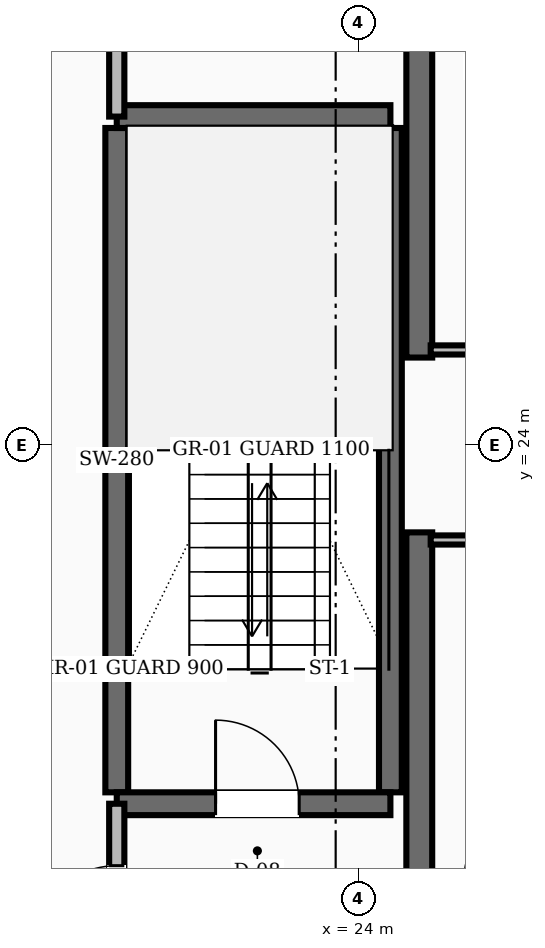
"""IFC4 building model, lengths in metres.
Left out: names, types, materials, properties, quantities, classifications, styles, units other than length and angle.
Written with IfcOpenShell. Run it as: python <this file> out.ifc"""

import sys

from ifc_helpers import new_model, si_unit, direction, frame, frame_2d, origin, place, context, subcontext, project, spatial, rectangle, extrude, element, fill, save


model = new_model("IFC4")
c1 = context("Model", 3, precision=1e-05, world=origin(), true_north=direction((0.0, 1.0)))
c2 = subcontext(c1, "Body", "Model", "MODEL_VIEW")
j1 = project(units=[si_unit("LENGTHUNIT", "METRE"), si_unit("PLANEANGLEUNIT", "RADIAN")], contexts=[c1])
p1 = place(None, origin())
s1 = spatial("IfcSite", under=j1, at=p1, CompositionType="ELEMENT")
p2 = place(p1, origin())
s2 = spatial("IfcBuilding", under=s1, at=p2, CompositionType="ELEMENT")
p3 = place(p2, frame((0.0, 0.0, 164.0)))
s3 = spatial("IfcBuildingStorey", under=s2, at=p3, CompositionType="ELEMENT", Elevation=164.0)
for number, where, z_axis, x_axis in (
    (1, (24.8, 16.55, 0.0), (0.0, 0.0, 1.0), (0.0, 1.0, 0.0)),
    (2, (24.8, 25.15, 0.0), (0.0, 0.0, 1.0), (0.0, 1.0, 0.0)),
):
    element("IfcWall", number, at=place(p3, frame(where, z_axis=z_axis, x_axis=x_axis)), inside=s3, PredefinedType="SHEAR", context=c2, shape_type="SweptSolid", body=[
        extrude(rectangle(XDim=6.3, YDim=0.34, at=frame_2d((3.15, 0.0))), origin(), (0.0, 0.0, 1.0), 3.6),
    ])
for number, where, z_axis, x_axis in (
    (3, (20.82, 19.43, 0.0), (0.0, 0.0, 1.0), (0.0, 1.0, 0.0)),
    (4, (24.42, 19.43, 0.0), (0.0, 0.0, 1.0), (0.0, 1.0, 0.0)),
):
    element("IfcWall", number, at=place(p3, frame(where, z_axis=z_axis, x_axis=x_axis)), inside=s3, PredefinedType="SHEAR", context=c2, shape_type="SweptSolid", body=[
        extrude(rectangle(XDim=8.74, YDim=0.3, at=frame_2d((4.37, 0.0))), origin(), (0.0, 0.0, 1.0), 3.6),
    ])
p4 = place(p3, frame((20.82, 19.28, 0.0), z_axis=(0.0, 0.0, 1.0), x_axis=(1.0, 0.0, 0.0)))
e5 = element("IfcWall", 5, at=p4, inside=s3, PredefinedType="SHEAR", context=c2, shape_type="SweptSolid", body=[
    extrude(rectangle(XDim=3.6, YDim=0.3, at=frame_2d((1.8, 0.0))), origin(), (0.0, 0.0, 1.0), 3.6),
])
p5 = place(p4, frame((1.3, 0.0, 0.0)))
e6 = element("IfcOpeningElement", 6, at=p5, cuts=e5, PredefinedType="OPENING", context=c2, shape_type="SweptSolid", body=[
    extrude(rectangle(XDim=1.1, YDim=2.1, at=frame_2d((0.55, 1.05))), frame((0.0, 0.16, 0.0), z_axis=(0.0, -1.0, 0.0), x_axis=(1.0, 0.0, 0.0)), (0.0, 0.0, 1.0), 0.32),
])
p6 = place(p3, frame((20.82, 28.32, 0.0), z_axis=(0.0, 0.0, 1.0), x_axis=(1.0, 0.0, 0.0)))
e7 = element("IfcWall", 7, at=p6, inside=s3, PredefinedType="SHEAR", context=c2, shape_type="SweptSolid", body=[
    extrude(rectangle(XDim=3.6, YDim=0.3, at=frame_2d((1.8, 0.0))), origin(), (0.0, 0.0, 1.0), 3.6),
])
p7 = place(p3, frame((20.82, 16.55, 0.0), z_axis=(0.0, 0.0, 1.0), x_axis=(0.0, 1.0, 0.0)))
e8 = element("IfcWall", 8, at=p7, inside=s3, PredefinedType="SOLIDWALL", context=c2, shape_type="SweptSolid", body=[
    extrude(rectangle(XDim=2.73, YDim=0.2, at=frame_2d((1.365, 0.0))), origin(), (0.0, 0.0, 1.0), 2.8),
])
p8 = place(p7, frame((0.815, 0.0, 0.0)))
e9 = element("IfcOpeningElement", 9, at=p8, cuts=e8, PredefinedType="OPENING", context=c2, shape_type="SweptSolid", body=[
    extrude(rectangle(XDim=1.1, YDim=2.1, at=frame_2d((0.55, 1.05))), frame((0.0, 0.11, 0.0), z_axis=(0.0, -1.0, 0.0), x_axis=(1.0, 0.0, 0.0)), (0.0, 0.0, 1.0), 0.22),
])
p9 = place(p3, frame((20.82, 28.32, 0.0), z_axis=(0.0, 0.0, 1.0), x_axis=(0.0, 1.0, 0.0)))
e10 = element("IfcWall", 10, at=p9, inside=s3, PredefinedType="SOLIDWALL", context=c2, shape_type="SweptSolid", body=[
    extrude(rectangle(XDim=3.13, YDim=0.2, at=frame_2d((1.565, 0.0))), origin(), (0.0, 0.0, 1.0), 2.8),
])
p10 = place(p9, frame((1.09, 0.0, 0.0)))
e11 = element("IfcOpeningElement", 11, at=p10, cuts=e10, PredefinedType="OPENING", context=c2, shape_type="SweptSolid", body=[
    extrude(rectangle(XDim=0.95, YDim=2.1, at=frame_2d((0.475, 1.05))), frame((0.0, 0.11, 0.0), z_axis=(0.0, -1.0, 0.0), x_axis=(1.0, 0.0, 0.0)), (0.0, 0.0, 1.0), 0.22),
])
p11 = place(p3, frame((24.95, 25.25, 0.0), z_axis=(0.0, 0.0, 1.0), x_axis=(1.0, 0.0, 0.0)))
e12 = element("IfcWall", 12, at=p11, inside=s3, PredefinedType="PARTITIONING", context=c2, shape_type="SweptSolid", body=[
    extrude(rectangle(XDim=3.2, YDim=0.12, at=frame_2d((1.6, 0.0))), origin(), (0.0, 0.0, 1.0), 2.8),
])
p12 = place(p11, frame((1.125, 0.0, 0.0)))
e13 = element("IfcOpeningElement", 13, at=p12, cuts=e12, PredefinedType="OPENING", context=c2, shape_type="SweptSolid", body=[
    extrude(rectangle(XDim=0.95, YDim=2.1, at=frame_2d((0.475, 1.05))), frame((0.0, 0.07, 0.0), z_axis=(0.0, -1.0, 0.0), x_axis=(1.0, 0.0, 0.0)), (0.0, 0.0, 1.0), 0.14),
])
p13 = place(p3, frame((24.95, 22.75, 0.0), z_axis=(0.0, 0.0, 1.0), x_axis=(1.0, 0.0, 0.0)))
e14 = element("IfcWall", 14, at=p13, inside=s3, PredefinedType="PARTITIONING", context=c2, shape_type="SweptSolid", body=[
    extrude(rectangle(XDim=3.2, YDim=0.12, at=frame_2d((1.6, 0.0))), origin(), (0.0, 0.0, 1.0), 2.8),
])
p14 = place(p13, frame((1.125, 0.0, 0.0)))
e15 = element("IfcOpeningElement", 15, at=p14, cuts=e14, PredefinedType="OPENING", context=c2, shape_type="SweptSolid", body=[
    extrude(rectangle(XDim=0.95, YDim=2.1, at=frame_2d((0.475, 1.05))), frame((0.0, 0.07, 0.0), z_axis=(0.0, -1.0, 0.0), x_axis=(1.0, 0.0, 0.0)), (0.0, 0.0, 1.0), 0.14),
])
p15 = place(p5, origin())
e16 = element("IfcDoor", 16, at=p15, inside=s3, OperationType="SINGLE_SWING_LEFT", PredefinedType="DOOR", context=c2, shape_type="SweptSolid", body=[
    extrude(rectangle(XDim=1.1, YDim=2.1, at=frame_2d((0.55, 1.05))), frame((0.0, 0.025, 0.0), z_axis=(0.0, -1.0, 0.0), x_axis=(1.0, 0.0, 0.0)), (0.0, 0.0, 1.0), 0.05),
])
fill(e6, e16)
p16 = place(p8, origin())
e17 = element("IfcDoor", 17, at=p16, inside=s3, OperationType="SINGLE_SWING_LEFT", PredefinedType="DOOR", context=c2, shape_type="SweptSolid", body=[
    extrude(rectangle(XDim=1.1, YDim=2.1, at=frame_2d((0.55, 1.05))), frame((0.0, 0.025, 0.0), z_axis=(0.0, -1.0, 0.0), x_axis=(1.0, 0.0, 0.0)), (0.0, 0.0, 1.0), 0.05),
])
fill(e9, e17)
save(model, sys.argv[1])
